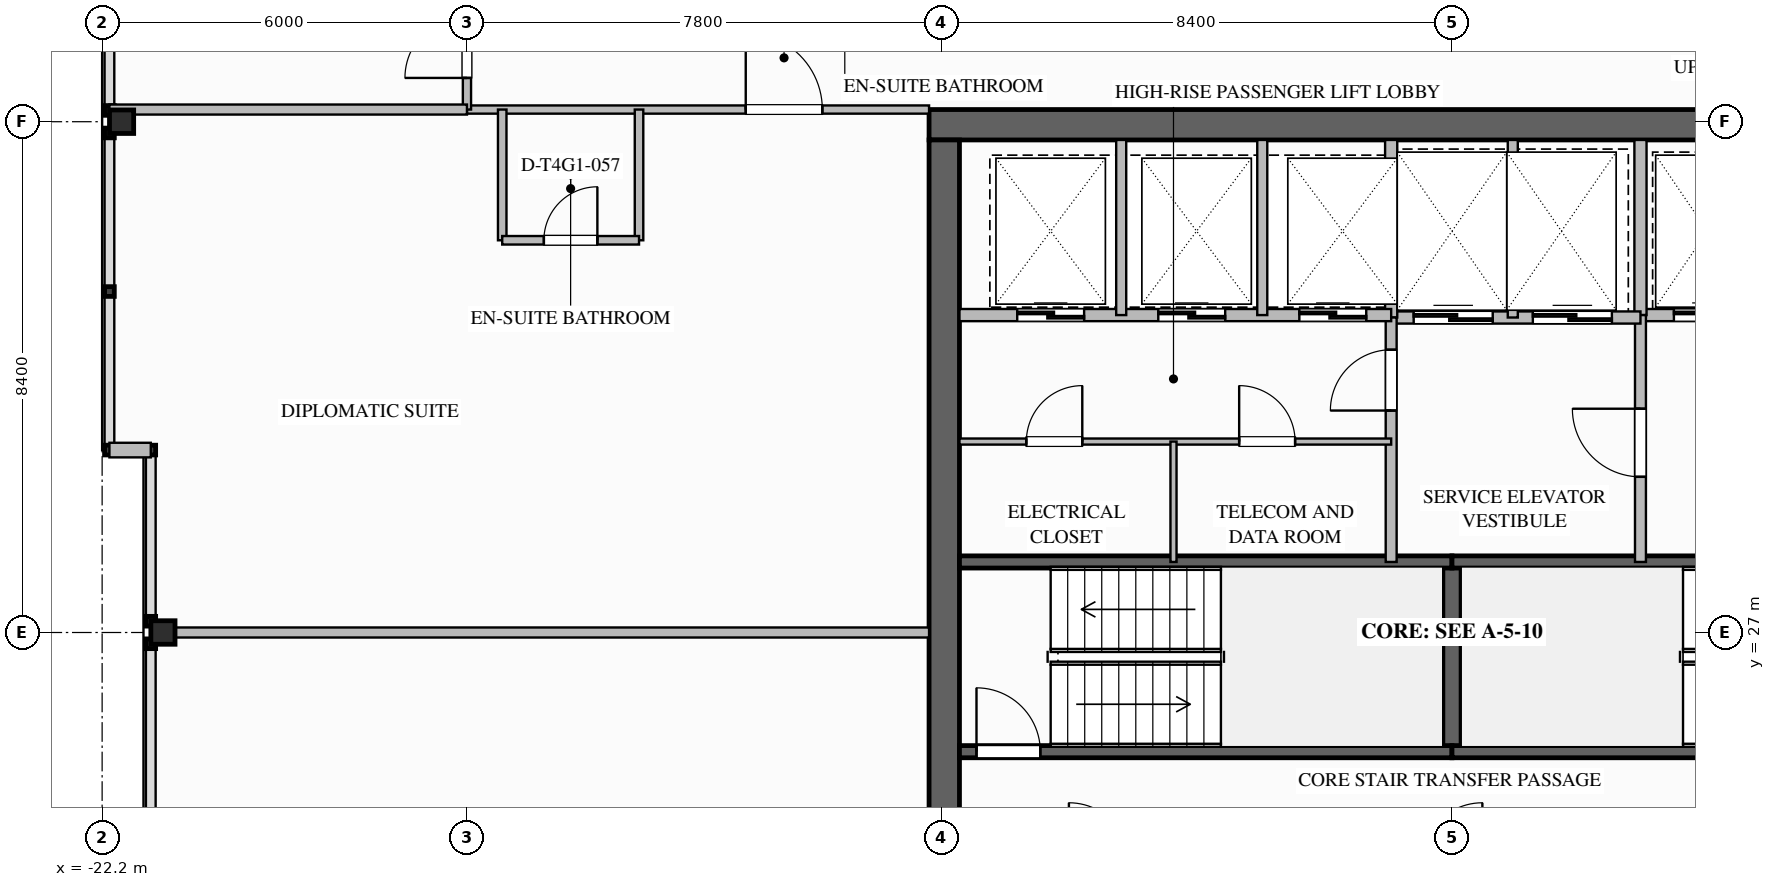
"""IFC4 building model, lengths in metres.
Left out: names, types, materials, properties, quantities, classifications, styles, units other than length and angle.
Written with IfcOpenShell. Run it as: python <this file> out.ifc"""

import sys

from ifc_helpers import new_model, si_unit, direction, frame, frame_2d, origin, origin_2d, place, context, subcontext, project, spatial, rectangle, i_section, extrude, element, fill, save


model = new_model("IFC4")
c1 = context("Model", 3, precision=1e-05, world=origin(), true_north=direction((0.0, 1.0)))
c2 = subcontext(c1, "Body", "Model", "MODEL_VIEW")
j1 = project(units=[si_unit("LENGTHUNIT", "METRE"), si_unit("PLANEANGLEUNIT", "RADIAN")], contexts=[c1])
p1 = place(None, origin())
s1 = spatial("IfcSite", under=j1, at=p1, CompositionType="ELEMENT")
p2 = place(p1, origin())
s2 = spatial("IfcBuilding", under=s1, at=p2, CompositionType="ELEMENT")
p3 = place(p2, frame((0.0, 0.0, 208.7)))
s3 = spatial("IfcBuildingStorey", under=s2, at=p3, CompositionType="ELEMENT", Elevation=208.7)
p4 = place(p3, frame((-8.6, 35.35, 0.0), z_axis=(0.0, 0.0, 1.0), x_axis=(1.0, 0.0, 0.0)))
e1 = element("IfcWall", 1, at=p4, inside=s3, PredefinedType="SHEAR", context=c2, shape_type="SweptSolid", body=[
    extrude(rectangle(XDim=17.2, YDim=0.5, at=frame_2d((8.6, 0.0))), origin(), (0.0, 0.0, 1.0), 3.6),
])
p5 = place(p3, frame((-8.35, 18.9, 0.0), z_axis=(0.0, 0.0, 1.0), x_axis=(0.0, 1.0, 0.0)))
e2 = element("IfcWall", 2, at=p5, inside=s3, PredefinedType="SHEAR", context=c2, shape_type="SweptSolid", body=[
    extrude(rectangle(XDim=16.2, YDim=0.5, at=frame_2d((8.1, 0.0))), origin(), (0.0, 0.0, 1.0), 3.6),
])
for number, where, z_axis, x_axis in (
    (3, (-21.2, 27.0, 0.0), (0.0, 0.0, 1.0), (1.0, 0.0, 0.0)),
    (4, (-21.88, 35.4, 0.0), (0.0, 0.0, 1.0), (1.0, 0.0, 0.0)),
):
    element("IfcColumn", number, at=place(p3, frame(where, z_axis=z_axis, x_axis=x_axis)), inside=s3, PredefinedType="COLUMN", context=c2, shape_type="SweptSolid", body=[
        extrude(i_section(OverallWidth=0.397, OverallDepth=0.387, WebThickness=0.021, FlangeThickness=0.033, FilletRadius=0.025, at=origin_2d()), origin(), (0.0, 0.0, 1.0), 3.597),
    ])
p6 = place(p3, frame((-21.4, 30.0, 0.0), z_axis=(0.0, 0.0, 1.0), x_axis=(-1.0, 0.0, 0.0)))
e5 = element("IfcWall", 5, at=p6, inside=s3, PredefinedType="STANDARD", context=c2, shape_type="SweptSolid", body=[
    extrude(rectangle(XDim=0.68, YDim=0.24, at=frame_2d((0.34, 0.0))), origin(), (0.0, 0.0, 1.0), 3.34),
])
p7 = place(p3, frame((0.0, 25.04, 0.0), z_axis=(0.0, 0.0, 1.0), x_axis=(0.0, 1.0, 0.0)))
e6 = element("IfcWall", 6, at=p7, inside=s3, PredefinedType="SOLIDWALL", context=c2, shape_type="SweptSolid", body=[
    extrude(rectangle(XDim=3.12, YDim=0.3, at=frame_2d((1.56, 0.0))), origin(), (0.0, 0.0, 1.0), 3.34),
])
p8 = place(p3, frame((-8.1, 25.04, 0.0), z_axis=(0.0, 0.0, 1.0), x_axis=(1.0, 0.0, 0.0)))
e7 = element("IfcWall", 7, at=p8, inside=s3, PredefinedType="SOLIDWALL", context=c2, shape_type="SweptSolid", body=[
    extrude(rectangle(XDim=8.1, YDim=0.2, at=frame_2d((4.05, 0.0))), origin(), (0.0, 0.0, 1.0), 3.34),
])
p9 = place(p8, frame((0.28, 0.0, 0.0)))
e8 = element("IfcOpeningElement", 8, at=p9, cuts=e7, PredefinedType="OPENING", context=c2, shape_type="SweptSolid", body=[
    extrude(rectangle(XDim=1.05, YDim=2.1, at=frame_2d((0.525, 1.05))), frame((0.0, 0.11, 0.0), z_axis=(0.0, -1.0, 0.0), x_axis=(1.0, 0.0, 0.0)), (0.0, 0.0, 1.0), 0.22),
])
for number, where, z_axis, x_axis in (
    (9, (-8.1, 28.16, 0.0), (0.0, 0.0, 1.0), (1.0, 0.0, 0.0)),
    (10, (0.0, 25.04, 0.0), (0.0, 0.0, 1.0), (1.0, 0.0, 0.0)),
):
    element("IfcWall", number, at=place(p3, frame(where, z_axis=z_axis, x_axis=x_axis)), inside=s3, PredefinedType="SOLIDWALL", context=c2, shape_type="SweptSolid", body=[
        extrude(rectangle(XDim=8.1, YDim=0.2, at=frame_2d((4.05, 0.0))), origin(), (0.0, 0.0, 1.0), 3.34),
    ])
p10 = place(p3, frame((8.1, 28.16, 0.0), z_axis=(0.0, 0.0, 1.0), x_axis=(-1.0, 0.0, 0.0)))
e11 = element("IfcWall", 11, at=p10, inside=s3, PredefinedType="SOLIDWALL", context=c2, shape_type="SweptSolid", body=[
    extrude(rectangle(XDim=8.1, YDim=0.2, at=frame_2d((4.05, 0.0))), origin(), (0.0, 0.0, 1.0), 3.34),
])
p11 = place(p10, frame((0.28, 0.0, 0.0)))
e12 = element("IfcOpeningElement", 12, at=p11, cuts=e11, PredefinedType="OPENING", context=c2, shape_type="SweptSolid", body=[
    extrude(rectangle(XDim=1.05, YDim=2.1, at=frame_2d((0.525, 1.05))), frame((0.0, 0.11, 0.0), z_axis=(0.0, -1.0, 0.0), x_axis=(1.0, 0.0, 0.0)), (0.0, 0.0, 1.0), 0.22),
])
p12 = place(p3, frame((3.1, 32.22, 0.0), z_axis=(0.0, 0.0, 1.0), x_axis=(1.0, 0.0, 0.0)))
e13 = element("IfcWall", 13, at=p12, inside=s3, PredefinedType="SOLIDWALL", context=c2, shape_type="SweptSolid", body=[
    extrude(rectangle(XDim=5.0, YDim=0.2, at=frame_2d((2.5, 0.0))), origin(), (0.0, 0.0, 1.0), 3.34),
])
p13 = place(p12, frame((0.55, 0.0, 0.0)))
e14 = element("IfcOpeningElement", 14, at=p13, cuts=e13, PredefinedType="OPENING", context=c2, shape_type="SweptSolid", body=[
    extrude(rectangle(XDim=1.2, YDim=2.2, at=frame_2d((0.6, 1.1))), frame((0.0, 0.11, 0.0), z_axis=(0.0, -1.0, 0.0), x_axis=(1.0, 0.0, 0.0)), (0.0, 0.0, 1.0), 0.22),
])
p14 = place(p12, frame((2.85, 0.0, 0.0)))
e15 = element("IfcOpeningElement", 15, at=p14, cuts=e13, PredefinedType="OPENING", context=c2, shape_type="SweptSolid", body=[
    extrude(rectangle(XDim=1.2, YDim=2.2, at=frame_2d((0.6, 1.1))), frame((0.0, 0.11, 0.0), z_axis=(0.0, -1.0, 0.0), x_axis=(1.0, 0.0, 0.0)), (0.0, 0.0, 1.0), 0.22),
])
p15 = place(p3, frame((3.1, 32.22, 0.0), z_axis=(0.0, 0.0, 1.0), x_axis=(0.0, 1.0, 0.0)))
e16 = element("IfcWall", 16, at=p15, inside=s3, PredefinedType="SOLIDWALL", context=c2, shape_type="SweptSolid", body=[
    extrude(rectangle(XDim=2.88, YDim=0.2, at=frame_2d((1.44, 0.0))), origin(), (0.0, 0.0, 1.0), 3.34),
])
p16 = place(p3, frame((3.1, 28.16, 0.0), z_axis=(0.0, 0.0, 1.0), x_axis=(0.0, 1.0, 0.0)))
e17 = element("IfcWall", 17, at=p16, inside=s3, PredefinedType="SOLIDWALL", context=c2, shape_type="SweptSolid", body=[
    extrude(rectangle(XDim=4.06, YDim=0.18, at=frame_2d((2.03, 0.0))), origin(), (0.0, 0.0, 1.0), 3.34),
])
p17 = place(p16, frame((1.4, 0.0, 0.0)))
e18 = element("IfcOpeningElement", 18, at=p17, cuts=e17, PredefinedType="OPENING", context=c2, shape_type="SweptSolid", body=[
    extrude(rectangle(XDim=1.12, YDim=2.1, at=frame_2d((0.56, 1.05))), frame((0.0, 0.1, 0.0), z_axis=(0.0, -1.0, 0.0), x_axis=(1.0, 0.0, 0.0)), (0.0, 0.0, 1.0), 0.2),
])
p18 = place(p3, frame((-1.0, 32.18, 0.0), z_axis=(0.0, 0.0, 1.0), x_axis=(1.0, 0.0, 0.0)))
e19 = element("IfcWall", 19, at=p18, inside=s3, PredefinedType="SOLIDWALL", context=c2, shape_type="SweptSolid", body=[
    extrude(rectangle(XDim=4.1, YDim=0.2, at=frame_2d((2.05, 0.0))), origin(), (0.0, 0.0, 1.0), 3.34),
])
p19 = place(p18, frame((0.37, 0.0, 0.0)))
e20 = element("IfcOpeningElement", 20, at=p19, cuts=e19, PredefinedType="OPENING", context=c2, shape_type="SweptSolid", body=[
    extrude(rectangle(XDim=1.3, YDim=2.2, at=frame_2d((0.65, 1.1))), frame((0.0, 0.11, 0.0), z_axis=(0.0, -1.0, 0.0), x_axis=(1.0, 0.0, 0.0)), (0.0, 0.0, 1.0), 0.22),
])
p20 = place(p18, frame((2.33, 0.0, 0.0)))
e21 = element("IfcOpeningElement", 21, at=p20, cuts=e19, PredefinedType="OPENING", context=c2, shape_type="SweptSolid", body=[
    extrude(rectangle(XDim=1.3, YDim=2.2, at=frame_2d((0.65, 1.1))), frame((0.0, 0.11, 0.0), z_axis=(0.0, -1.0, 0.0), x_axis=(1.0, 0.0, 0.0)), (0.0, 0.0, 1.0), 0.22),
])
p21 = place(p3, frame((-1.0, 32.18, 0.0), z_axis=(0.0, 0.0, 1.0), x_axis=(0.0, 1.0, 0.0)))
e22 = element("IfcWall", 22, at=p21, inside=s3, PredefinedType="SOLIDWALL", context=c2, shape_type="SweptSolid", body=[
    extrude(rectangle(XDim=2.92, YDim=0.2, at=frame_2d((1.46, 0.0))), origin(), (0.0, 0.0, 1.0), 3.34),
])
p22 = place(p3, frame((1.0, 32.18, 0.0), z_axis=(0.0, 0.0, 1.0), x_axis=(0.0, 1.0, 0.0)))
e23 = element("IfcWall", 23, at=p22, inside=s3, PredefinedType="PARTITIONING", context=c2, shape_type="SweptSolid", body=[
    extrude(rectangle(XDim=2.92, YDim=0.165, at=frame_2d((1.46, 0.0))), origin(), (0.0, 0.0, 1.0), 3.34),
])
p23 = place(p3, frame((-1.0, 28.16, 0.0), z_axis=(0.0, 0.0, 1.0), x_axis=(0.0, 1.0, 0.0)))
e24 = element("IfcWall", 24, at=p23, inside=s3, PredefinedType="SOLIDWALL", context=c2, shape_type="SweptSolid", body=[
    extrude(rectangle(XDim=4.02, YDim=0.18, at=frame_2d((2.01, 0.0))), origin(), (0.0, 0.0, 1.0), 3.34),
])
p24 = place(p23, frame((2.49, 0.0, 0.0)))
e25 = element("IfcOpeningElement", 25, at=p24, cuts=e24, PredefinedType="OPENING", context=c2, shape_type="SweptSolid", body=[
    extrude(rectangle(XDim=1.0, YDim=2.1, at=frame_2d((0.5, 1.05))), frame((0.0, 0.1, 0.0), z_axis=(0.0, -1.0, 0.0), x_axis=(1.0, 0.0, 0.0)), (0.0, 0.0, 1.0), 0.2),
])
p25 = place(p3, frame((-8.1, 32.22, 0.0), z_axis=(0.0, 0.0, 1.0), x_axis=(1.0, 0.0, 0.0)))
e26 = element("IfcWall", 26, at=p25, inside=s3, PredefinedType="SOLIDWALL", context=c2, shape_type="SweptSolid", body=[
    extrude(rectangle(XDim=7.1, YDim=0.2, at=frame_2d((3.55, 0.0))), origin(), (0.0, 0.0, 1.0), 3.34),
])
p26 = place(p25, frame((0.95, 0.0, 0.0)))
e27 = element("IfcOpeningElement", 27, at=p26, cuts=e26, PredefinedType="OPENING", context=c2, shape_type="SweptSolid", body=[
    extrude(rectangle(XDim=1.1, YDim=2.2, at=frame_2d((0.55, 1.1))), frame((0.0, 0.11, 0.0), z_axis=(0.0, -1.0, 0.0), x_axis=(1.0, 0.0, 0.0)), (0.0, 0.0, 1.0), 0.22),
])
p27 = place(p25, frame((3.27, 0.0, 0.0)))
e28 = element("IfcOpeningElement", 28, at=p27, cuts=e26, PredefinedType="OPENING", context=c2, shape_type="SweptSolid", body=[
    extrude(rectangle(XDim=1.1, YDim=2.2, at=frame_2d((0.55, 1.1))), frame((0.0, 0.11, 0.0), z_axis=(0.0, -1.0, 0.0), x_axis=(1.0, 0.0, 0.0)), (0.0, 0.0, 1.0), 0.22),
])
p28 = place(p25, frame((5.59, 0.0, 0.0)))
e29 = element("IfcOpeningElement", 29, at=p28, cuts=e26, PredefinedType="OPENING", context=c2, shape_type="SweptSolid", body=[
    extrude(rectangle(XDim=1.1, YDim=2.2, at=frame_2d((0.55, 1.1))), frame((0.0, 0.11, 0.0), z_axis=(0.0, -1.0, 0.0), x_axis=(1.0, 0.0, 0.0)), (0.0, 0.0, 1.0), 0.22),
])
for number, where, z_axis, x_axis in (
    (30, (-5.44, 32.22, 0.0), (0.0, 0.0, 1.0), (0.0, 1.0, 0.0)),
    (31, (-3.12, 32.22, 0.0), (0.0, 0.0, 1.0), (0.0, 1.0, 0.0)),
):
    element("IfcWall", number, at=place(p3, frame(where, z_axis=z_axis, x_axis=x_axis)), inside=s3, PredefinedType="PARTITIONING", context=c2, shape_type="SweptSolid", body=[
        extrude(rectangle(XDim=2.88, YDim=0.165, at=frame_2d((1.44, 0.0))), origin(), (0.0, 0.0, 1.0), 3.34),
    ])
p29 = place(p3, frame((-8.1, 30.14, 0.0), z_axis=(0.0, 0.0, 1.0), x_axis=(1.0, 0.0, 0.0)))
e32 = element("IfcWall", 32, at=p29, inside=s3, PredefinedType="PARTITIONING", context=c2, shape_type="SweptSolid", body=[
    extrude(rectangle(XDim=7.1, YDim=0.1, at=frame_2d((3.55, 0.0))), origin(), (0.0, 0.0, 1.0), 3.34),
])
p30 = place(p29, frame((1.1, 0.0, 0.0)))
e33 = element("IfcOpeningElement", 33, at=p30, cuts=e32, PredefinedType="OPENING", context=c2, shape_type="SweptSolid", body=[
    extrude(rectangle(XDim=0.92, YDim=2.1, at=frame_2d((0.46, 1.05))), frame((0.0, 0.06, 0.0), z_axis=(0.0, -1.0, 0.0), x_axis=(1.0, 0.0, 0.0)), (0.0, 0.0, 1.0), 0.12),
])
p31 = place(p29, frame((4.6, 0.0, 0.0)))
e34 = element("IfcOpeningElement", 34, at=p31, cuts=e32, PredefinedType="OPENING", context=c2, shape_type="SweptSolid", body=[
    extrude(rectangle(XDim=0.92, YDim=2.1, at=frame_2d((0.46, 1.05))), frame((0.0, 0.06, 0.0), z_axis=(0.0, -1.0, 0.0), x_axis=(1.0, 0.0, 0.0)), (0.0, 0.0, 1.0), 0.12),
])
p32 = place(p3, frame((-4.58, 28.16, 0.0), z_axis=(0.0, 0.0, 1.0), x_axis=(0.0, 1.0, 0.0)))
e35 = element("IfcWall", 35, at=p32, inside=s3, PredefinedType="PARTITIONING", context=c2, shape_type="SweptSolid", body=[
    extrude(rectangle(XDim=1.98, YDim=0.1, at=frame_2d((0.99, 0.0))), origin(), (0.0, 0.0, 1.0), 3.34),
])
p33 = place(p3, frame((-16.2, 35.6, 0.0), z_axis=(0.0, 0.0, 1.0), x_axis=(1.0, 0.0, 0.0)))
e36 = element("IfcWall", 36, at=p33, inside=s3, PredefinedType="PARTITIONING", context=c2, shape_type="SweptSolid", body=[
    extrude(rectangle(XDim=7.6, YDim=0.135, at=frame_2d((3.8, 0.0))), origin(), (0.0, 0.0, 1.0), 2.718),
])
p34 = place(p33, frame((4.585, 0.0, 0.0)))
e37 = element("IfcOpeningElement", 37, at=p34, cuts=e36, PredefinedType="OPENING", context=c2, shape_type="SweptSolid", body=[
    extrude(rectangle(XDim=1.26, YDim=2.2, at=frame_2d((0.63, 1.1))), frame((0.0, 0.077, 0.0), z_axis=(0.0, -1.0, 0.0), x_axis=(1.0, 0.0, 0.0)), (0.0, 0.0, 1.0), 0.155),
])
p35 = place(p3, frame((-16.2, 35.6, 0.0), z_axis=(0.0, 0.0, 1.0), x_axis=(0.0, 1.0, 0.0)))
e38 = element("IfcWall", 38, at=p35, inside=s3, PredefinedType="PARTITIONING", context=c2, shape_type="SweptSolid", body=[
    extrude(rectangle(XDim=2.1, YDim=0.135, at=frame_2d((1.05, 0.0))), origin(), (0.0, 0.0, 1.0), 2.714),
])
p36 = place(p35, frame((0.52, 0.0, 0.0)))
e39 = element("IfcOpeningElement", 39, at=p36, cuts=e38, PredefinedType="OPENING", context=c2, shape_type="SweptSolid", body=[
    extrude(rectangle(XDim=1.02, YDim=2.15, at=frame_2d((0.51, 1.075))), frame((0.0, 0.077, 0.0), z_axis=(0.0, -1.0, 0.0), x_axis=(1.0, 0.0, 0.0)), (0.0, 0.0, 1.0), 0.155),
])
p37 = place(p3, frame((-22.08, 35.6, 0.0), z_axis=(0.0, 0.0, 1.0), x_axis=(1.0, 0.0, 0.0)))
e40 = element("IfcWall", 40, at=p37, inside=s3, PredefinedType="PARTITIONING", context=c2, shape_type="SweptSolid", body=[
    extrude(rectangle(XDim=5.88, YDim=0.165, at=frame_2d((2.94, 0.0))), origin(), (0.0, 0.0, 1.0), 2.714),
])
p38 = place(p3, frame((-21.4, 27.0, 0.0), z_axis=(0.0, 0.0, 1.0), x_axis=(1.0, 0.0, 0.0)))
e41 = element("IfcWall", 41, at=p38, inside=s3, PredefinedType="PARTITIONING", context=c2, shape_type="SweptSolid", body=[
    extrude(rectangle(XDim=12.8, YDim=0.165, at=frame_2d((6.4, 0.0))), origin(), (0.0, 0.0, 1.0), 2.714),
])
for number, where, z_axis, x_axis in (
    (42, (-15.62, 35.6, 0.0), (0.0, 0.0, 1.0), (0.0, -1.0, 0.0)),
    (43, (-13.37, 35.6, 0.0), (0.0, 0.0, 1.0), (0.0, -1.0, 0.0)),
):
    element("IfcWall", number, at=place(p3, frame(where, z_axis=z_axis, x_axis=x_axis)), inside=s3, PredefinedType="PLUMBINGWALL", context=c2, shape_type="SweptSolid", body=[
        extrude(rectangle(XDim=2.15, YDim=0.14, at=frame_2d((1.075, 0.0))), origin(), (0.0, 0.0, 1.0), 3.34),
    ])
p39 = place(p3, frame((-15.62, 33.45, 0.0), z_axis=(0.0, 0.0, 1.0), x_axis=(1.0, 0.0, 0.0)))
e44 = element("IfcWall", 44, at=p39, inside=s3, PredefinedType="PLUMBINGWALL", context=c2, shape_type="SweptSolid", body=[
    extrude(rectangle(XDim=2.25, YDim=0.14, at=frame_2d((1.125, 0.0))), origin(), (0.0, 0.0, 1.0), 3.34),
])
p40 = place(p39, frame((0.685, 0.0, 0.0)))
e45 = element("IfcOpeningElement", 45, at=p40, cuts=e44, PredefinedType="OPENING", context=c2, shape_type="SweptSolid", body=[
    extrude(rectangle(XDim=0.88, YDim=2.1, at=frame_2d((0.44, 1.05))), frame((0.0, 0.08, 0.0), z_axis=(0.0, -1.0, 0.0), x_axis=(1.0, 0.0, 0.0)), (0.0, 0.0, 1.0), 0.16),
])
p41 = place(p9, origin())
e46 = element("IfcDoor", 46, at=p41, inside=s3, OperationType="SINGLE_SWING_LEFT", PredefinedType="DOOR", context=c2, shape_type="SweptSolid", body=[
    extrude(rectangle(XDim=1.05, YDim=2.1, at=frame_2d((0.525, 1.05))), frame((0.0, 0.025, 0.0), z_axis=(0.0, -1.0, 0.0), x_axis=(1.0, 0.0, 0.0)), (0.0, 0.0, 1.0), 0.05),
])
fill(e8, e46)
p42 = place(p13, origin())
e47 = element("IfcDoor", 47, at=p42, inside=s3, OperationType="SLIDING_TO_LEFT", PredefinedType="DOOR", context=c2, shape_type="SweptSolid", body=[
    extrude(rectangle(XDim=1.2, YDim=2.2, at=frame_2d((0.6, 1.1))), frame((0.0, 0.025, 0.0), z_axis=(0.0, -1.0, 0.0), x_axis=(1.0, 0.0, 0.0)), (0.0, 0.0, 1.0), 0.05),
])
fill(e14, e47)
p43 = place(p17, origin())
e48 = element("IfcDoor", 48, at=p43, inside=s3, OperationType="SINGLE_SWING_RIGHT", PredefinedType="DOOR", context=c2, shape_type="SweptSolid", body=[
    extrude(rectangle(XDim=1.12, YDim=2.1, at=frame_2d((0.56, 1.05))), frame((0.0, 0.025, 0.0), z_axis=(0.0, -1.0, 0.0), x_axis=(1.0, 0.0, 0.0)), (0.0, 0.0, 1.0), 0.05),
])
fill(e18, e48)
p44 = place(p19, origin())
e49 = element("IfcDoor", 49, at=p44, inside=s3, OperationType="SLIDING_TO_LEFT", PredefinedType="DOOR", context=c2, shape_type="SweptSolid", body=[
    extrude(rectangle(XDim=1.3, YDim=2.2, at=frame_2d((0.65, 1.1))), frame((0.0, 0.025, 0.0), z_axis=(0.0, -1.0, 0.0), x_axis=(1.0, 0.0, 0.0)), (0.0, 0.0, 1.0), 0.05),
])
fill(e20, e49)
p45 = place(p20, origin())
e50 = element("IfcDoor", 50, at=p45, inside=s3, OperationType="SLIDING_TO_LEFT", PredefinedType="DOOR", context=c2, shape_type="SweptSolid", body=[
    extrude(rectangle(XDim=1.3, YDim=2.2, at=frame_2d((0.65, 1.1))), frame((0.0, 0.025, 0.0), z_axis=(0.0, -1.0, 0.0), x_axis=(1.0, 0.0, 0.0)), (0.0, 0.0, 1.0), 0.05),
])
fill(e21, e50)
p46 = place(p24, origin())
e51 = element("IfcDoor", 51, at=p46, inside=s3, OperationType="SINGLE_SWING_LEFT", PredefinedType="DOOR", context=c2, shape_type="SweptSolid", body=[
    extrude(rectangle(XDim=1.0, YDim=2.1, at=frame_2d((0.5, 1.05))), frame((0.0, 0.025, 0.0), z_axis=(0.0, -1.0, 0.0), x_axis=(1.0, 0.0, 0.0)), (0.0, 0.0, 1.0), 0.05),
])
fill(e25, e51)
p47 = place(p26, origin())
e52 = element("IfcDoor", 52, at=p47, inside=s3, OperationType="SLIDING_TO_LEFT", PredefinedType="DOOR", context=c2, shape_type="SweptSolid", body=[
    extrude(rectangle(XDim=1.1, YDim=2.2, at=frame_2d((0.55, 1.1))), frame((0.0, 0.025, 0.0), z_axis=(0.0, -1.0, 0.0), x_axis=(1.0, 0.0, 0.0)), (0.0, 0.0, 1.0), 0.05),
])
fill(e27, e52)
p48 = place(p27, origin())
e53 = element("IfcDoor", 53, at=p48, inside=s3, OperationType="SLIDING_TO_LEFT", PredefinedType="DOOR", context=c2, shape_type="SweptSolid", body=[
    extrude(rectangle(XDim=1.1, YDim=2.2, at=frame_2d((0.55, 1.1))), frame((0.0, 0.025, 0.0), z_axis=(0.0, -1.0, 0.0), x_axis=(1.0, 0.0, 0.0)), (0.0, 0.0, 1.0), 0.05),
])
fill(e28, e53)
p49 = place(p28, origin())
e54 = element("IfcDoor", 54, at=p49, inside=s3, OperationType="SLIDING_TO_LEFT", PredefinedType="DOOR", context=c2, shape_type="SweptSolid", body=[
    extrude(rectangle(XDim=1.1, YDim=2.2, at=frame_2d((0.55, 1.1))), frame((0.0, 0.025, 0.0), z_axis=(0.0, -1.0, 0.0), x_axis=(1.0, 0.0, 0.0)), (0.0, 0.0, 1.0), 0.05),
])
fill(e29, e54)
p50 = place(p30, origin())
e55 = element("IfcDoor", 55, at=p50, inside=s3, OperationType="SINGLE_SWING_RIGHT", PredefinedType="DOOR", context=c2, shape_type="SweptSolid", body=[
    extrude(rectangle(XDim=0.92, YDim=2.1, at=frame_2d((0.46, 1.05))), frame((0.0, 0.025, 0.0), z_axis=(0.0, -1.0, 0.0), x_axis=(1.0, 0.0, 0.0)), (0.0, 0.0, 1.0), 0.05),
])
fill(e33, e55)
p51 = place(p31, origin())
e56 = element("IfcDoor", 56, at=p51, inside=s3, OperationType="SINGLE_SWING_LEFT", PredefinedType="DOOR", context=c2, shape_type="SweptSolid", body=[
    extrude(rectangle(XDim=0.92, YDim=2.1, at=frame_2d((0.46, 1.05))), frame((0.0, 0.025, 0.0), z_axis=(0.0, -1.0, 0.0), x_axis=(1.0, 0.0, 0.0)), (0.0, 0.0, 1.0), 0.05),
])
fill(e34, e56)
p52 = place(p36, origin())
e57 = element("IfcDoor", 57, at=p52, inside=s3, OperationType="SINGLE_SWING_LEFT", PredefinedType="DOOR", context=c2, shape_type="SweptSolid", body=[
    extrude(rectangle(XDim=1.02, YDim=2.15, at=frame_2d((0.51, 1.075))), frame((0.0, 0.025, 0.0), z_axis=(0.0, -1.0, 0.0), x_axis=(1.0, 0.0, 0.0)), (0.0, 0.0, 1.0), 0.05),
])
fill(e39, e57)
p53 = place(p40, origin())
e58 = element("IfcDoor", 58, at=p53, inside=s3, OperationType="SINGLE_SWING_RIGHT", PredefinedType="DOOR", context=c2, shape_type="SweptSolid", body=[
    extrude(rectangle(XDim=0.88, YDim=2.1, at=frame_2d((0.44, 1.05))), frame((0.0, 0.025, 0.0), z_axis=(0.0, -1.0, 0.0), x_axis=(1.0, 0.0, 0.0)), (0.0, 0.0, 1.0), 0.05),
])
fill(e45, e58)
p54 = place(p34, origin())
e59 = element("IfcDoor", 59, at=p54, inside=s3, OperationType="SINGLE_SWING_LEFT", PredefinedType="DOOR", context=c2, shape_type="SweptSolid", body=[
    extrude(rectangle(XDim=1.26, YDim=2.2, at=frame_2d((0.63, 1.1))), frame((0.0, 0.025, 0.0), z_axis=(0.0, -1.0, 0.0), x_axis=(1.0, 0.0, 0.0)), (0.0, 0.0, 1.0), 0.05),
])
fill(e37, e59)
save(model, sys.argv[1])
